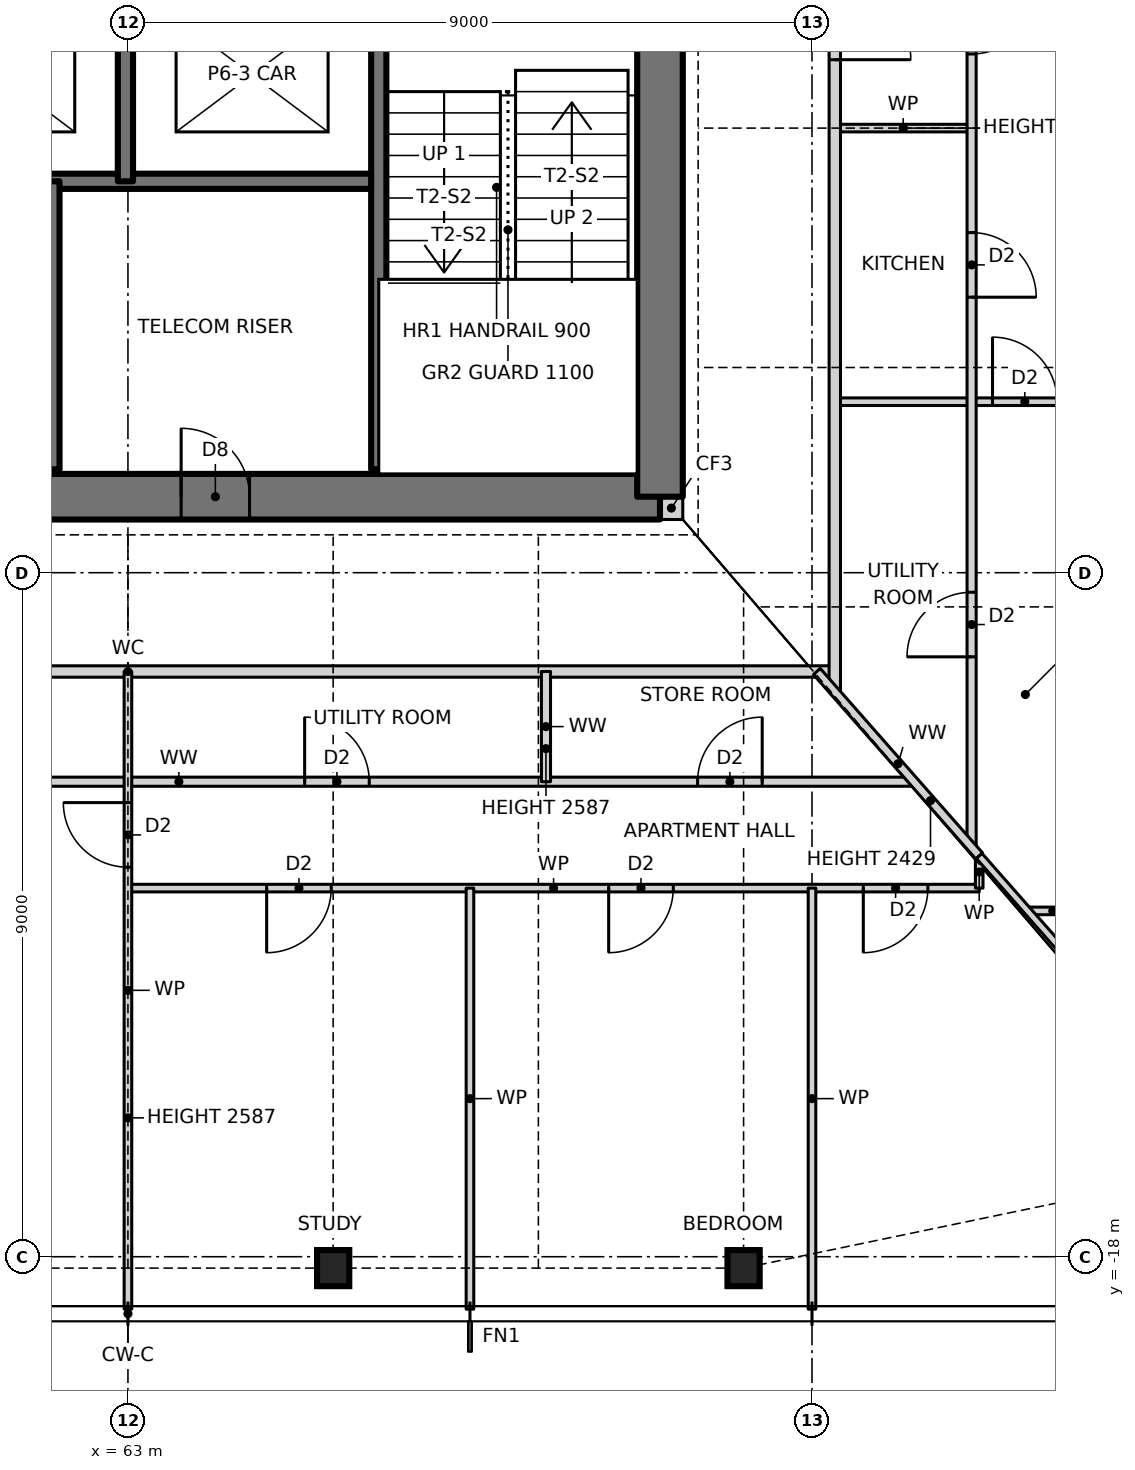
"""IFC4 building model, lengths in metres.
Left out: names, types, materials, properties, quantities, classifications, styles, units other than length and angle.
Written with IfcOpenShell. Run it as: python <this file> out.ifc"""

import sys

from ifc_helpers import new_model, si_unit, direction, frame, frame_2d, origin, origin_2d, place, context, subcontext, project, spatial, rectangle, i_section, extrude, element, fill, save


model = new_model("IFC4")
c1 = context("Model", 3, precision=1e-05, world=origin(), true_north=direction((0.0, 1.0)))
c2 = subcontext(c1, "Body", "Model", "MODEL_VIEW")
j1 = project(units=[si_unit("LENGTHUNIT", "METRE"), si_unit("PLANEANGLEUNIT", "RADIAN")], contexts=[c1])
p1 = place(None, origin())
s1 = spatial("IfcSite", under=j1, at=p1, CompositionType="ELEMENT")
p2 = place(p1, origin())
s2 = spatial("IfcBuilding", under=s1, at=p2, CompositionType="ELEMENT")
p3 = place(p2, frame((0.0, 0.0, 53.5)))
s3 = spatial("IfcBuildingStorey", under=s2, at=p3, CompositionType="ELEMENT", Elevation=53.5)
for number, where, z_axis, x_axis in (
    (1, (65.7, -18.15, 0.0), (0.0, 0.0, 1.0), (1.0, 0.0, 0.0)),
    (2, (71.1, -18.15, 0.0), (0.0, 0.0, 1.0), (1.0, 0.0, 0.0)),
):
    element("IfcColumn", number, at=place(p3, frame(where, z_axis=z_axis, x_axis=x_axis)), inside=s3, PredefinedType="COLUMN", context=c2, shape_type="SweptSolid", body=[
        extrude(i_section(OverallWidth=0.424, OverallDepth=0.475, WebThickness=0.048, FlangeThickness=0.077, at=origin_2d()), origin(), (0.0, 0.0, 1.0), 3.5),
    ])
p4 = place(p3, frame((70.0, -8.15, 0.0), z_axis=(0.0, 0.0, 1.0), x_axis=(1.0, 0.0, 0.0)))
e3 = element("IfcWall", 3, at=p4, inside=s3, PredefinedType="SOLIDWALL", context=c2, shape_type="SweptSolid", body=[
    extrude(rectangle(XDim=0.3, YDim=0.3, at=frame_2d((0.15, 0.0))), origin(), (0.0, 0.0, 1.0), 3.5),
])
p5 = place(p3, frame((56.0, -8.0, 0.0), z_axis=(0.0, 0.0, 1.0), x_axis=(1.0, 0.0, 0.0)))
e4 = element("IfcWall", 4, at=p5, inside=s3, PredefinedType="SHEAR", context=c2, shape_type="SweptSolid", body=[
    extrude(rectangle(XDim=14.0, YDim=0.6, at=frame_2d((7.0, 0.0))), origin(), (0.0, 0.0, 1.0), 3.5),
])
p6 = place(p5, frame((2.7, 0.0, 0.0)))
e5 = element("IfcOpeningElement", 5, at=p6, cuts=e4, PredefinedType="OPENING", context=c2, shape_type="SweptSolid", body=[
    extrude(rectangle(XDim=0.9, YDim=2.1, at=frame_2d((0.45, 1.05))), frame((0.0, 0.31, 0.0), z_axis=(0.0, -1.0, 0.0), x_axis=(1.0, 0.0, 0.0)), (0.0, 0.0, 1.0), 0.62),
])
p7 = place(p5, frame((7.7, 0.0, 0.0)))
e6 = element("IfcOpeningElement", 6, at=p7, cuts=e4, PredefinedType="OPENING", context=c2, shape_type="SweptSolid", body=[
    extrude(rectangle(XDim=0.9, YDim=2.1, at=frame_2d((0.45, 1.05))), frame((0.0, 0.31, 0.0), z_axis=(0.0, -1.0, 0.0), x_axis=(1.0, 0.0, 0.0)), (0.0, 0.0, 1.0), 0.62),
])
p8 = place(p3, frame((70.0, -8.0, 0.0), z_axis=(0.0, 0.0, 1.0), x_axis=(0.0, 1.0, 0.0)))
e7 = element("IfcWall", 7, at=p8, inside=s3, PredefinedType="SHEAR", context=c2, shape_type="SweptSolid", body=[
    extrude(rectangle(XDim=16.0, YDim=0.6, at=frame_2d((8.0, 0.0))), origin(), (0.0, 0.0, 1.0), 3.5),
])
p9 = place(p8, frame((7.5, 0.0, 0.0)))
e8 = element("IfcOpeningElement", 8, at=p9, cuts=e7, PredefinedType="OPENING", context=c2, shape_type="SweptSolid", body=[
    extrude(rectangle(XDim=1.0, YDim=2.1, at=frame_2d((0.5, 1.05))), frame((0.0, 0.31, 0.0), z_axis=(0.0, -1.0, 0.0), x_axis=(1.0, 0.0, 0.0)), (0.0, 0.0, 1.0), 0.62),
])
p10 = place(p3, frame((74.836, -13.45, 0.0), z_axis=(0.0, 0.0, 1.0), x_axis=(1.0, 0.0, 0.0)))
e9 = element("IfcWall", 9, at=p10, inside=s3, PredefinedType="PARTITIONING", context=c2, shape_type="SweptSolid", body=[
    extrude(rectangle(XDim=0.664, YDim=0.1, at=frame_2d((0.332, 0.0))), origin(), (0.0, 0.0, 1.0), 3.27),
])
p11 = place(p3, frame((63.0, -13.15, 0.0), z_axis=(0.0, 0.0, 1.0), x_axis=(1.0, 0.0, 0.0)))
e10 = element("IfcWall", 10, at=p11, inside=s3, PredefinedType="PARTITIONING", context=c2, shape_type="SweptSolid", body=[
    extrude(rectangle(XDim=11.2, YDim=0.1, at=frame_2d((5.6, 0.0))), origin(), (0.0, 0.0, 1.0), 3.27),
])
p12 = place(p11, frame((1.825, 0.0, 0.0)))
e11 = element("IfcOpeningElement", 11, at=p12, cuts=e10, PredefinedType="OPENING", context=c2, shape_type="SweptSolid", body=[
    extrude(rectangle(XDim=0.85, YDim=2.1, at=frame_2d((0.425, 1.05))), frame((0.0, 0.06, 0.0), z_axis=(0.0, -1.0, 0.0), x_axis=(1.0, 0.0, 0.0)), (0.0, 0.0, 1.0), 0.12),
])
p13 = place(p11, frame((6.325, 0.0, 0.0)))
e12 = element("IfcOpeningElement", 12, at=p13, cuts=e10, PredefinedType="OPENING", context=c2, shape_type="SweptSolid", body=[
    extrude(rectangle(XDim=0.85, YDim=2.1, at=frame_2d((0.425, 1.05))), frame((0.0, 0.06, 0.0), z_axis=(0.0, -1.0, 0.0), x_axis=(1.0, 0.0, 0.0)), (0.0, 0.0, 1.0), 0.12),
])
p14 = place(p11, frame((9.675, 0.0, 0.0)))
e13 = element("IfcOpeningElement", 13, at=p14, cuts=e10, PredefinedType="OPENING", context=c2, shape_type="SweptSolid", body=[
    extrude(rectangle(XDim=0.85, YDim=2.1, at=frame_2d((0.425, 1.05))), frame((0.0, 0.06, 0.0), z_axis=(0.0, -1.0, 0.0), x_axis=(1.0, 0.0, 0.0)), (0.0, 0.0, 1.0), 0.12),
])
p15 = place(p3, frame((54.0, -11.75, 0.0), z_axis=(0.0, 0.0, 1.0), x_axis=(1.0, 0.0, 0.0)))
e14 = element("IfcWall", 14, at=p15, inside=s3, PredefinedType="PARTITIONING", context=c2, shape_type="SweptSolid", body=[
    extrude(rectangle(XDim=19.34, YDim=0.12, at=frame_2d((9.67, 0.0))), origin(), (0.0, 0.0, 1.0), 3.27),
])
p16 = place(p15, frame((1.375, 0.0, 0.0)))
e15 = element("IfcOpeningElement", 15, at=p16, cuts=e14, PredefinedType="OPENING", context=c2, shape_type="SweptSolid", body=[
    extrude(rectangle(XDim=0.85, YDim=2.1, at=frame_2d((0.425, 1.05))), frame((0.0, 0.07, 0.0), z_axis=(0.0, -1.0, 0.0), x_axis=(1.0, 0.0, 0.0)), (0.0, 0.0, 1.0), 0.14),
])
p17 = place(p15, frame((4.575, 0.0, 0.0)))
e16 = element("IfcOpeningElement", 16, at=p17, cuts=e14, PredefinedType="OPENING", context=c2, shape_type="SweptSolid", body=[
    extrude(rectangle(XDim=0.85, YDim=2.1, at=frame_2d((0.425, 1.05))), frame((0.0, 0.07, 0.0), z_axis=(0.0, -1.0, 0.0), x_axis=(1.0, 0.0, 0.0)), (0.0, 0.0, 1.0), 0.14),
])
p18 = place(p15, frame((11.325, 0.0, 0.0)))
e17 = element("IfcOpeningElement", 17, at=p18, cuts=e14, PredefinedType="OPENING", context=c2, shape_type="SweptSolid", body=[
    extrude(rectangle(XDim=0.85, YDim=2.1, at=frame_2d((0.425, 1.05))), frame((0.0, 0.07, 0.0), z_axis=(0.0, -1.0, 0.0), x_axis=(1.0, 0.0, 0.0)), (0.0, 0.0, 1.0), 0.14),
])
p19 = place(p15, frame((16.495, 0.0, 0.0)))
e18 = element("IfcOpeningElement", 18, at=p19, cuts=e14, PredefinedType="OPENING", context=c2, shape_type="SweptSolid", body=[
    extrude(rectangle(XDim=0.85, YDim=2.1, at=frame_2d((0.425, 1.05))), frame((0.0, 0.07, 0.0), z_axis=(0.0, -1.0, 0.0), x_axis=(1.0, 0.0, 0.0)), (0.0, 0.0, 1.0), 0.14),
])
p20 = place(p3, frame((53.7, -10.3, 0.0), z_axis=(0.0, 0.0, 1.0), x_axis=(1.0, 0.0, 0.0)))
e19 = element("IfcWall", 19, at=p20, inside=s3, PredefinedType="PARTITIONING", context=c2, shape_type="SweptSolid", body=[
    extrude(rectangle(XDim=18.6, YDim=0.15, at=frame_2d((9.3, 0.0))), origin(), (0.0, 0.0, 1.0), 3.27),
])
p21 = place(p20, frame((4.8, 0.0, 0.0)))
e20 = element("IfcOpeningElement", 20, at=p21, cuts=e19, PredefinedType="OPENING", context=c2, shape_type="SweptSolid", body=[
    extrude(rectangle(XDim=1.0, YDim=2.1, at=frame_2d((0.5, 1.05))), frame((0.0, 0.085, 0.0), z_axis=(0.0, -1.0, 0.0), x_axis=(1.0, 0.0, 0.0)), (0.0, 0.0, 1.0), 0.17),
])
p22 = place(p3, frame((72.3, -6.75, 0.0), z_axis=(0.0, 0.0, 1.0), x_axis=(1.0, 0.0, 0.0)))
e21 = element("IfcWall", 21, at=p22, inside=s3, PredefinedType="PARTITIONING", context=c2, shape_type="SweptSolid", body=[
    extrude(rectangle(XDim=7.14, YDim=0.1, at=frame_2d((3.57, 0.0))), origin(), (0.0, 0.0, 1.0), 3.27),
])
p23 = place(p22, frame((2.075, 0.0, 0.0)))
e22 = element("IfcOpeningElement", 22, at=p23, cuts=e21, PredefinedType="OPENING", context=c2, shape_type="SweptSolid", body=[
    extrude(rectangle(XDim=0.85, YDim=2.1, at=frame_2d((0.425, 1.05))), frame((0.0, 0.06, 0.0), z_axis=(0.0, -1.0, 0.0), x_axis=(1.0, 0.0, 0.0)), (0.0, 0.0, 1.0), 0.12),
])
p24 = place(p3, frame((56.36, -3.85, 0.0), z_axis=(0.0, 0.0, 1.0), x_axis=(1.0, 0.0, 0.0)))
e23 = element("IfcWall", 23, at=p24, inside=s3, PredefinedType="SOLIDWALL", context=c2, shape_type="SweptSolid", body=[
    extrude(rectangle(XDim=9.94, YDim=0.2, at=frame_2d((4.97, 0.0))), origin(), (0.0, 0.0, 1.0), 3.5),
])
p25 = place(p3, frame((72.3, -3.15, 0.0), z_axis=(0.0, 0.0, 1.0), x_axis=(1.0, 0.0, 0.0)))
e24 = element("IfcWall", 24, at=p25, inside=s3, PredefinedType="PARTITIONING", context=c2, shape_type="SweptSolid", body=[
    extrude(rectangle(XDim=1.8, YDim=0.1, at=frame_2d((0.9, 0.0))), origin(), (0.0, 0.0, 1.0), 2.587),
])
p26 = place(p3, frame((74.2, -13.15, 0.0), z_axis=(0.0, 0.0, 1.0), x_axis=(0.0, 1.0, 0.0)))
e25 = element("IfcWall", 25, at=p26, inside=s3, PredefinedType="PARTITIONING", context=c2, shape_type="SweptSolid", body=[
    extrude(rectangle(XDim=0.423, YDim=0.1, at=frame_2d((0.211, 0.0))), origin(), (0.0, 0.0, 1.0), 3.27),
])
p27 = place(p3, frame((74.1, -12.614, 0.0), z_axis=(0.0, 0.0, 1.0), x_axis=(0.0, 1.0, 0.0)))
e26 = element("IfcWall", 26, at=p27, inside=s3, PredefinedType="PARTITIONING", context=c2, shape_type="SweptSolid", body=[
    extrude(rectangle(XDim=25.228, YDim=0.12, at=frame_2d((12.614, 0.0))), origin(), (0.0, 0.0, 1.0), 3.27),
])
p28 = place(p27, frame((7.239, 0.0, 0.0)))
e27 = element("IfcOpeningElement", 27, at=p28, cuts=e26, PredefinedType="OPENING", context=c2, shape_type="SweptSolid", body=[
    extrude(rectangle(XDim=0.85, YDim=2.1, at=frame_2d((0.425, 1.05))), frame((0.0, 0.07, 0.0), z_axis=(0.0, -1.0, 0.0), x_axis=(1.0, 0.0, 0.0)), (0.0, 0.0, 1.0), 0.14),
])
p29 = place(p27, frame((10.439, 0.0, 0.0)))
e28 = element("IfcOpeningElement", 28, at=p29, cuts=e26, PredefinedType="OPENING", context=c2, shape_type="SweptSolid", body=[
    extrude(rectangle(XDim=0.85, YDim=2.1, at=frame_2d((0.425, 1.05))), frame((0.0, 0.07, 0.0), z_axis=(0.0, -1.0, 0.0), x_axis=(1.0, 0.0, 0.0)), (0.0, 0.0, 1.0), 0.14),
])
p30 = place(p27, frame((2.507, 0.0, 0.0)))
e29 = element("IfcOpeningElement", 29, at=p30, cuts=e26, PredefinedType="OPENING", context=c2, shape_type="SweptSolid", body=[
    extrude(rectangle(XDim=0.85, YDim=2.1, at=frame_2d((0.425, 1.05))), frame((0.0, 0.07, 0.0), z_axis=(0.0, -1.0, 0.0), x_axis=(1.0, 0.0, 0.0)), (0.0, 0.0, 1.0), 0.14),
])
p31 = place(p27, frame((16.639, 0.0, 0.0)))
e30 = element("IfcOpeningElement", 30, at=p31, cuts=e26, PredefinedType="OPENING", context=c2, shape_type="SweptSolid", body=[
    extrude(rectangle(XDim=0.85, YDim=2.1, at=frame_2d((0.425, 1.05))), frame((0.0, 0.07, 0.0), z_axis=(0.0, -1.0, 0.0), x_axis=(1.0, 0.0, 0.0)), (0.0, 0.0, 1.0), 0.14),
])
p32 = place(p27, frame((21.821, 0.0, 0.0)))
e31 = element("IfcOpeningElement", 31, at=p32, cuts=e26, PredefinedType="OPENING", context=c2, shape_type="SweptSolid", body=[
    extrude(rectangle(XDim=0.85, YDim=2.1, at=frame_2d((0.425, 1.05))), frame((0.0, 0.07, 0.0), z_axis=(0.0, -1.0, 0.0), x_axis=(1.0, 0.0, 0.0)), (0.0, 0.0, 1.0), 0.14),
])
p33 = place(p3, frame((72.3, -10.568, 0.0), z_axis=(0.0, 0.0, 1.0), x_axis=(0.0, 1.0, 0.0)))
e32 = element("IfcWall", 32, at=p33, inside=s3, PredefinedType="PARTITIONING", context=c2, shape_type="SweptSolid", body=[
    extrude(rectangle(XDim=21.136, YDim=0.15, at=frame_2d((10.568, 0.0))), origin(), (0.0, 0.0, 1.0), 3.27),
])
p34 = place(p33, frame((8.318, 0.0, 0.0)))
e33 = element("IfcOpeningElement", 33, at=p34, cuts=e32, PredefinedType="OPENING", context=c2, shape_type="SweptSolid", body=[
    extrude(rectangle(XDim=1.0, YDim=2.1, at=frame_2d((0.5, 1.05))), frame((0.0, 0.085, 0.0), z_axis=(0.0, -1.0, 0.0), x_axis=(1.0, 0.0, 0.0)), (0.0, 0.0, 1.0), 0.17),
])
p35 = place(p3, frame((72.0, -18.69, 0.0), z_axis=(0.0, 0.0, 1.0), x_axis=(0.0, 1.0, 0.0)))
e34 = element("IfcWall", 34, at=p35, inside=s3, PredefinedType="PARTITIONING", context=c2, shape_type="SweptSolid", body=[
    extrude(rectangle(XDim=5.54, YDim=0.1, at=frame_2d((2.77, 0.0))), origin(), (0.0, 0.0, 1.0), 3.27),
])
p36 = place(p3, frame((68.5, -11.75, 0.0), z_axis=(0.0, 0.0, 1.0), x_axis=(0.0, 1.0, 0.0)))
e35 = element("IfcWall", 35, at=p36, inside=s3, PredefinedType="PARTITIONING", context=c2, shape_type="SweptSolid", body=[
    extrude(rectangle(XDim=1.45, YDim=0.12, at=frame_2d((0.725, 0.0))), origin(), (0.0, 0.0, 1.0), 2.587),
])
p37 = place(p3, frame((67.5, -18.69, 0.0), z_axis=(0.0, 0.0, 1.0), x_axis=(0.0, 1.0, 0.0)))
e36 = element("IfcWall", 36, at=p37, inside=s3, PredefinedType="PARTITIONING", context=c2, shape_type="SweptSolid", body=[
    extrude(rectangle(XDim=5.54, YDim=0.1, at=frame_2d((2.77, 0.0))), origin(), (0.0, 0.0, 1.0), 3.27),
])
p38 = place(p3, frame((66.3, -7.64, 0.0), z_axis=(0.0, 0.0, 1.0), x_axis=(0.0, 1.0, 0.0)))
e37 = element("IfcWall", 37, at=p38, inside=s3, PredefinedType="SOLIDWALL", context=c2, shape_type="SweptSolid", body=[
    extrude(rectangle(XDim=11.49, YDim=0.2, at=frame_2d((5.745, 0.0))), origin(), (0.0, 0.0, 1.0), 3.5),
])
p39 = place(p38, frame((7.04, 0.0, 0.0)))
e38 = element("IfcOpeningElement", 38, at=p39, cuts=e37, PredefinedType="OPENING", context=c2, shape_type="SweptSolid", body=[
    extrude(rectangle(XDim=1.2, YDim=2.1, at=frame_2d((0.6, 1.05))), frame((0.0, 0.11, 0.0), z_axis=(0.0, -1.0, 0.0), x_axis=(1.0, 0.0, 0.0)), (0.0, 0.0, 1.0), 0.22),
])
p40 = place(p3, frame((63.0, -18.69, 0.0), z_axis=(0.0, 0.0, 1.0), x_axis=(0.0, 1.0, 0.0)))
e39 = element("IfcWall", 39, at=p40, inside=s3, PredefinedType="PARTITIONING", context=c2, shape_type="SweptSolid", body=[
    extrude(rectangle(XDim=8.39, YDim=0.1, at=frame_2d((4.195, 0.0))), origin(), (0.0, 0.0, 1.0), 2.587),
])
p41 = place(p40, frame((5.815, 0.0, 0.0)))
e40 = element("IfcOpeningElement", 40, at=p41, cuts=e39, PredefinedType="OPENING", context=c2, shape_type="SweptSolid", body=[
    extrude(rectangle(XDim=0.85, YDim=2.1, at=frame_2d((0.425, 1.05))), frame((0.0, 0.06, 0.0), z_axis=(0.0, -1.0, 0.0), x_axis=(1.0, 0.0, 0.0)), (0.0, 0.0, 1.0), 0.12),
])
p42 = place(p3, frame((62.967, -3.85, 0.0), z_axis=(0.0, 0.0, 1.0), x_axis=(0.0, 1.0, 0.0)))
e41 = element("IfcWall", 41, at=p42, inside=s3, PredefinedType="SOLIDWALL", context=c2, shape_type="SweptSolid", body=[
    extrude(rectangle(XDim=2.8, YDim=0.2, at=frame_2d((1.4, 0.0))), origin(), (0.0, 0.0, 1.0), 3.5),
])
p43 = place(p3, frame((62.0, -7.64, 0.0), z_axis=(0.0, 0.0, 1.0), x_axis=(0.0, 1.0, 0.0)))
e42 = element("IfcWall", 42, at=p43, inside=s3, PredefinedType="SOLIDWALL", context=c2, shape_type="SweptSolid", body=[
    extrude(rectangle(XDim=3.79, YDim=0.2, at=frame_2d((1.895, 0.0))), origin(), (0.0, 0.0, 1.0), 3.5),
])
p44 = place(p3, frame((74.2, -12.727, 0.0), z_axis=(0.0, 0.0, 1.0), x_axis=(-0.660667046586, 0.75067906162, 0.0)))
e43 = element("IfcWall", 43, at=p44, inside=s3, PredefinedType="PARTITIONING", context=c2, shape_type="SweptSolid", body=[
    extrude(rectangle(XDim=3.233, YDim=0.12, at=frame_2d((1.617, 0.0))), origin(), (0.0, 0.0, 1.0), 2.429),
])
p45 = place(p3, frame((78.057, -17.109, 0.0), z_axis=(0.0, 0.0, 1.0), x_axis=(-0.660698595885, 0.750651294141, 0.0)))
e44 = element("IfcWall", 44, at=p45, inside=s3, PredefinedType="PARTITIONING", context=c2, shape_type="SweptSolid", body=[
    extrude(rectangle(XDim=5.838, YDim=0.1, at=frame_2d((2.919, 0.0))), origin(), (0.0, 0.0, 1.0), 2.429),
])
p46 = place(p41, origin())
e45 = element("IfcDoor", 45, at=p46, inside=s3, OperationType="SINGLE_SWING_RIGHT", PredefinedType="DOOR", context=c2, shape_type="SweptSolid", body=[
    extrude(rectangle(XDim=0.85, YDim=2.1, at=frame_2d((0.425, 1.05))), frame((0.0, 0.025, 0.0), z_axis=(0.0, -1.0, 0.0), x_axis=(1.0, 0.0, 0.0)), (0.0, 0.0, 1.0), 0.05),
])
fill(e40, e45)
p47 = place(p12, frame((0.85, 0.0, 0.0), z_axis=(0.0, 0.0, 1.0), x_axis=(-1.0, 0.0, 0.0)))
e46 = element("IfcDoor", 46, at=p47, inside=s3, OperationType="SINGLE_SWING_RIGHT", PredefinedType="DOOR", context=c2, shape_type="SweptSolid", body=[
    extrude(rectangle(XDim=0.85, YDim=2.1, at=frame_2d((0.425, 1.05))), frame((0.0, 0.025, 0.0), z_axis=(0.0, -1.0, 0.0), x_axis=(1.0, 0.0, 0.0)), (0.0, 0.0, 1.0), 0.05),
])
fill(e11, e46)
p48 = place(p13, frame((0.85, 0.0, 0.0), z_axis=(0.0, 0.0, 1.0), x_axis=(-1.0, 0.0, 0.0)))
e47 = element("IfcDoor", 47, at=p48, inside=s3, OperationType="SINGLE_SWING_RIGHT", PredefinedType="DOOR", context=c2, shape_type="SweptSolid", body=[
    extrude(rectangle(XDim=0.85, YDim=2.1, at=frame_2d((0.425, 1.05))), frame((0.0, 0.025, 0.0), z_axis=(0.0, -1.0, 0.0), x_axis=(1.0, 0.0, 0.0)), (0.0, 0.0, 1.0), 0.05),
])
fill(e12, e47)
p49 = place(p14, frame((0.85, 0.0, 0.0), z_axis=(0.0, 0.0, 1.0), x_axis=(-1.0, 0.0, 0.0)))
e48 = element("IfcDoor", 48, at=p49, inside=s3, OperationType="SINGLE_SWING_RIGHT", PredefinedType="DOOR", context=c2, shape_type="SweptSolid", body=[
    extrude(rectangle(XDim=0.85, YDim=2.1, at=frame_2d((0.425, 1.05))), frame((0.0, 0.025, 0.0), z_axis=(0.0, -1.0, 0.0), x_axis=(1.0, 0.0, 0.0)), (0.0, 0.0, 1.0), 0.05),
])
fill(e13, e48)
p50 = place(p18, origin())
e49 = element("IfcDoor", 49, at=p50, inside=s3, OperationType="SINGLE_SWING_LEFT", PredefinedType="DOOR", context=c2, shape_type="SweptSolid", body=[
    extrude(rectangle(XDim=0.85, YDim=2.1, at=frame_2d((0.425, 1.05))), frame((0.0, 0.025, 0.0), z_axis=(0.0, -1.0, 0.0), x_axis=(1.0, 0.0, 0.0)), (0.0, 0.0, 1.0), 0.05),
])
fill(e17, e49)
p51 = place(p19, origin())
e50 = element("IfcDoor", 50, at=p51, inside=s3, OperationType="SINGLE_SWING_RIGHT", PredefinedType="DOOR", context=c2, shape_type="SweptSolid", body=[
    extrude(rectangle(XDim=0.85, YDim=2.1, at=frame_2d((0.425, 1.05))), frame((0.0, 0.025, 0.0), z_axis=(0.0, -1.0, 0.0), x_axis=(1.0, 0.0, 0.0)), (0.0, 0.0, 1.0), 0.05),
])
fill(e18, e50)
p52 = place(p28, frame((0.85, 0.0, 0.0), z_axis=(0.0, 0.0, 1.0), x_axis=(-1.0, 0.0, 0.0)))
e51 = element("IfcDoor", 51, at=p52, inside=s3, OperationType="SINGLE_SWING_RIGHT", PredefinedType="DOOR", context=c2, shape_type="SweptSolid", body=[
    extrude(rectangle(XDim=0.85, YDim=2.1, at=frame_2d((0.425, 1.05))), frame((0.0, 0.025, 0.0), z_axis=(0.0, -1.0, 0.0), x_axis=(1.0, 0.0, 0.0)), (0.0, 0.0, 1.0), 0.05),
])
fill(e27, e51)
p53 = place(p34, frame((1.0, 0.0, 0.0), z_axis=(0.0, 0.0, 1.0), x_axis=(-1.0, 0.0, 0.0)))
e52 = element("IfcDoor", 52, at=p53, inside=s3, OperationType="SINGLE_SWING_RIGHT", PredefinedType="DOOR", context=c2, shape_type="SweptSolid", body=[
    extrude(rectangle(XDim=1.0, YDim=2.1, at=frame_2d((0.5, 1.05))), frame((0.0, 0.025, 0.0), z_axis=(0.0, -1.0, 0.0), x_axis=(1.0, 0.0, 0.0)), (0.0, 0.0, 1.0), 0.05),
])
fill(e33, e52)
p54 = place(p29, frame((0.85, 0.0, 0.0), z_axis=(0.0, 0.0, 1.0), x_axis=(-1.0, 0.0, 0.0)))
e53 = element("IfcDoor", 53, at=p54, inside=s3, OperationType="SINGLE_SWING_LEFT", PredefinedType="DOOR", context=c2, shape_type="SweptSolid", body=[
    extrude(rectangle(XDim=0.85, YDim=2.1, at=frame_2d((0.425, 1.05))), frame((0.0, 0.025, 0.0), z_axis=(0.0, -1.0, 0.0), x_axis=(1.0, 0.0, 0.0)), (0.0, 0.0, 1.0), 0.05),
])
fill(e28, e53)
p55 = place(p23, origin())
e54 = element("IfcDoor", 54, at=p55, inside=s3, OperationType="SINGLE_SWING_LEFT", PredefinedType="DOOR", context=c2, shape_type="SweptSolid", body=[
    extrude(rectangle(XDim=0.85, YDim=2.1, at=frame_2d((0.425, 1.05))), frame((0.0, 0.025, 0.0), z_axis=(0.0, -1.0, 0.0), x_axis=(1.0, 0.0, 0.0)), (0.0, 0.0, 1.0), 0.05),
])
fill(e22, e54)
p56 = place(p30, origin())
e55 = element("IfcDoor", 55, at=p56, inside=s3, OperationType="SINGLE_SWING_LEFT", PredefinedType="DOOR", context=c2, shape_type="SweptSolid", body=[
    extrude(rectangle(XDim=0.85, YDim=2.1, at=frame_2d((0.425, 1.05))), frame((0.0, 0.025, 0.0), z_axis=(0.0, -1.0, 0.0), x_axis=(1.0, 0.0, 0.0)), (0.0, 0.0, 1.0), 0.05),
])
fill(e29, e55)
p57 = place(p7, origin())
e56 = element("IfcDoor", 56, at=p57, inside=s3, OperationType="SINGLE_SWING_LEFT", PredefinedType="DOOR", context=c2, shape_type="SweptSolid", body=[
    extrude(rectangle(XDim=0.9, YDim=2.1, at=frame_2d((0.45, 1.05))), frame((0.0, 0.025, 0.0), z_axis=(0.0, -1.0, 0.0), x_axis=(1.0, 0.0, 0.0)), (0.0, 0.0, 1.0), 0.05),
])
fill(e6, e56)
save(model, sys.argv[1])
